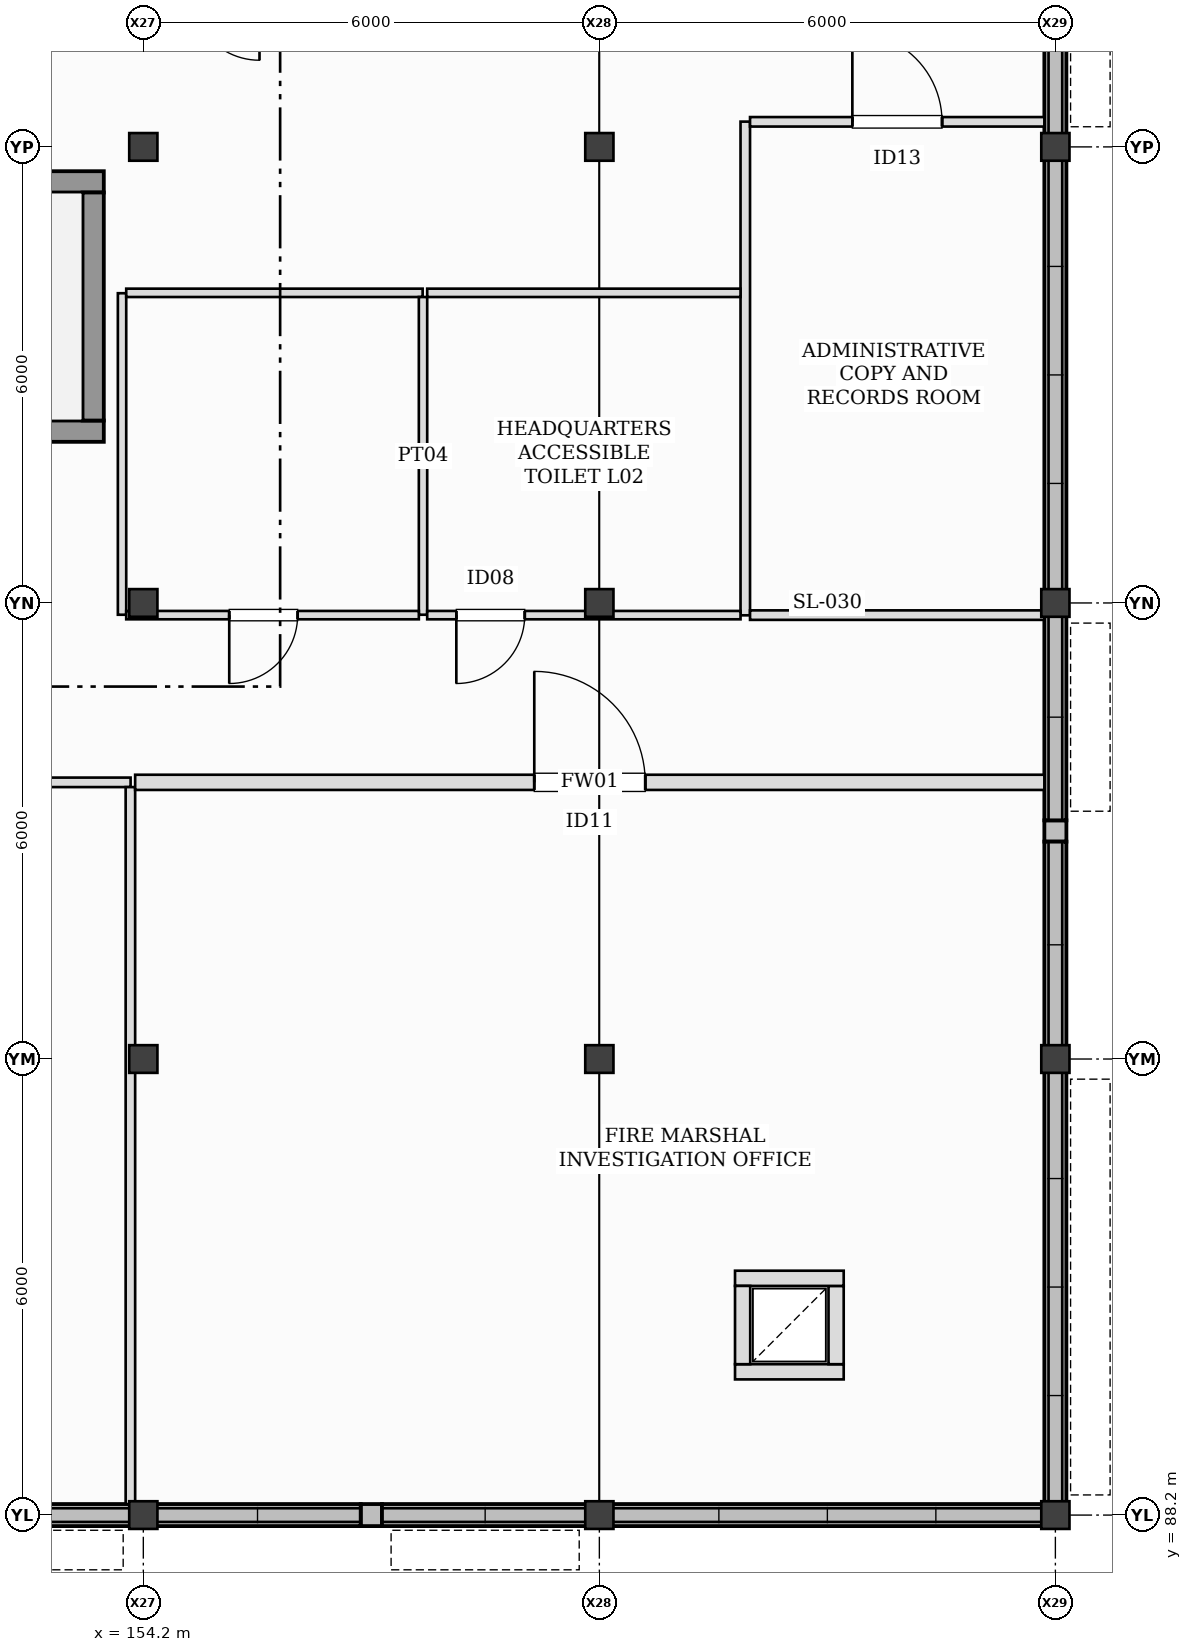
"""IFC4 building model, lengths in metres.
Left out: names, types, materials, properties, quantities, classifications, styles, units other than length and angle.
Written with IfcOpenShell. Run it as: python <this file> out.ifc"""

import sys

from ifc_helpers import new_model, si_unit, direction, frame, frame_2d, origin, origin_2d, place, context, subcontext, project, spatial, rectangle, i_section, extrude, element, fill, save


model = new_model("IFC4")
c1 = context("Model", 3, precision=1e-05, world=origin(), true_north=direction((0.0, 1.0)))
c2 = subcontext(c1, "Body", "Model", "MODEL_VIEW")
j1 = project(units=[si_unit("LENGTHUNIT", "METRE"), si_unit("PLANEANGLEUNIT", "RADIAN")], contexts=[c1])
p1 = place(None, origin())
s1 = spatial("IfcSite", under=j1, at=p1, CompositionType="ELEMENT")
p2 = place(p1, origin())
s2 = spatial("IfcBuilding", under=s1, at=p2, CompositionType="ELEMENT")
p3 = place(p2, frame((0.0, 0.0, 6.0)))
s3 = spatial("IfcBuildingStorey", under=s2, at=p3, CompositionType="ELEMENT", Elevation=6.0)
for number, where, z_axis, x_axis in (
    (1, (154.2, 88.2, 0.0), (0.0, 0.0, 1.0), (1.0, 0.0, 0.0)),
    (2, (154.2, 94.2, 0.0), (0.0, 0.0, 1.0), (1.0, 0.0, 0.0)),
    (3, (154.2, 100.2, 0.0), (0.0, 0.0, 1.0), (1.0, 0.0, 0.0)),
    (4, (154.2, 106.2, 0.0), (0.0, 0.0, 1.0), (1.0, 0.0, 0.0)),
    (5, (160.2, 88.2, 0.0), (0.0, 0.0, 1.0), (1.0, 0.0, 0.0)),
    (6, (160.2, 94.2, 0.0), (0.0, 0.0, 1.0), (1.0, 0.0, 0.0)),
    (7, (160.2, 100.2, 0.0), (0.0, 0.0, 1.0), (1.0, 0.0, 0.0)),
    (8, (160.2, 106.2, 0.0), (0.0, 0.0, 1.0), (1.0, 0.0, 0.0)),
    (9, (166.2, 88.2, 0.0), (0.0, 0.0, 1.0), (1.0, 0.0, 0.0)),
    (10, (166.2, 94.2, 0.0), (0.0, 0.0, 1.0), (1.0, 0.0, 0.0)),
    (11, (166.2, 100.2, 0.0), (0.0, 0.0, 1.0), (1.0, 0.0, 0.0)),
    (12, (166.2, 106.2, 0.0), (0.0, 0.0, 1.0), (1.0, 0.0, 0.0)),
):
    element("IfcColumn", number, at=place(p3, frame(where, z_axis=z_axis, x_axis=x_axis)), inside=s3, PredefinedType="COLUMN", context=c2, shape_type="SweptSolid", body=[
        extrude(i_section(OverallWidth=0.371, OverallDepth=0.364, WebThickness=0.013, FlangeThickness=0.022, at=origin_2d()), origin(), (0.0, 0.0, 1.0), 4.0),
    ])
p4 = place(p3, frame((148.345, 88.2, 0.0), z_axis=(0.0, 0.0, 1.0), x_axis=(1.0, 0.0, 0.0)))
e13 = element("IfcWall", 13, at=p4, inside=s3, PredefinedType="STANDARD", context=c2, shape_type="SweptSolid", body=[
    extrude(rectangle(XDim=5.71, YDim=0.29, at=frame_2d((2.855, 0.0))), origin(), (0.0, 0.0, 1.0), 0.56),
])
p5 = place(p3, frame((157.06, 88.2, 0.0), z_axis=(0.0, 0.0, 1.0), x_axis=(1.0, 0.0, 0.0)))
e14 = element("IfcWall", 14, at=p5, inside=s3, PredefinedType="STANDARD", context=c2, shape_type="SweptSolid", body=[
    extrude(rectangle(XDim=0.28, YDim=0.29, at=frame_2d((0.14, 0.0))), origin(), (0.0, 0.0, 1.0), 3.153),
])
p6 = place(p3, frame((154.345, 88.2, 0.0), z_axis=(0.0, 0.0, 1.0), x_axis=(1.0, 0.0, 0.0)))
e15 = element("IfcWall", 15, at=p6, inside=s3, PredefinedType="STANDARD", context=c2, shape_type="SweptSolid", body=[
    extrude(rectangle(XDim=2.715, YDim=0.29, at=frame_2d((1.357, 0.0))), origin(), (0.0, 0.0, 1.0), 0.68),
])
p7 = place(p3, frame((157.34, 88.2, 0.0), z_axis=(0.0, 0.0, 1.0), x_axis=(1.0, 0.0, 0.0)))
e16 = element("IfcWall", 16, at=p7, inside=s3, PredefinedType="STANDARD", context=c2, shape_type="SweptSolid", body=[
    extrude(rectangle(XDim=2.715, YDim=0.29, at=frame_2d((1.357, 0.0))), origin(), (0.0, 0.0, 1.0), 0.8),
])
p8 = place(p3, frame((160.345, 88.2, 0.0), z_axis=(0.0, 0.0, 1.0), x_axis=(1.0, 0.0, 0.0)))
e17 = element("IfcWall", 17, at=p8, inside=s3, PredefinedType="STANDARD", context=c2, shape_type="SweptSolid", body=[
    extrude(rectangle(XDim=5.71, YDim=0.29, at=frame_2d((2.855, 0.0))), origin(), (0.0, 0.0, 1.0), 0.92),
])
p9 = place(p3, frame((166.2, 88.345, 0.0), z_axis=(0.0, 0.0, 1.0), x_axis=(0.0, 1.0, 0.0)))
e18 = element("IfcWall", 18, at=p9, inside=s3, PredefinedType="STANDARD", context=c2, shape_type="SweptSolid", body=[
    extrude(rectangle(XDim=5.71, YDim=0.29, at=frame_2d((2.855, 0.0))), origin(), (0.0, 0.0, 1.0), 0.32),
])
p10 = place(p3, frame((166.2, 97.06, 0.0), z_axis=(0.0, 0.0, 1.0), x_axis=(0.0, 1.0, 0.0)))
e19 = element("IfcWall", 19, at=p10, inside=s3, PredefinedType="STANDARD", context=c2, shape_type="SweptSolid", body=[
    extrude(rectangle(XDim=0.28, YDim=0.29, at=frame_2d((0.14, 0.0))), origin(), (0.0, 0.0, 1.0), 3.227),
])
p11 = place(p3, frame((166.2, 94.345, 0.0), z_axis=(0.0, 0.0, 1.0), x_axis=(0.0, 1.0, 0.0)))
e20 = element("IfcWall", 20, at=p11, inside=s3, PredefinedType="STANDARD", context=c2, shape_type="SweptSolid", body=[
    extrude(rectangle(XDim=2.715, YDim=0.29, at=frame_2d((1.357, 0.0))), origin(), (0.0, 0.0, 1.0), 0.44),
])
p12 = place(p3, frame((166.2, 97.34, 0.0), z_axis=(0.0, 0.0, 1.0), x_axis=(0.0, 1.0, 0.0)))
e21 = element("IfcWall", 21, at=p12, inside=s3, PredefinedType="STANDARD", context=c2, shape_type="SweptSolid", body=[
    extrude(rectangle(XDim=2.715, YDim=0.29, at=frame_2d((1.357, 0.0))), origin(), (0.0, 0.0, 1.0), 0.56),
])
p13 = place(p3, frame((166.2, 100.345, 0.0), z_axis=(0.0, 0.0, 1.0), x_axis=(0.0, 1.0, 0.0)))
e22 = element("IfcWall", 22, at=p13, inside=s3, PredefinedType="STANDARD", context=c2, shape_type="SweptSolid", body=[
    extrude(rectangle(XDim=5.71, YDim=0.29, at=frame_2d((2.855, 0.0))), origin(), (0.0, 0.0, 1.0), 0.68),
])
p14 = place(p3, frame((166.2, 106.345, 0.0), z_axis=(0.0, 0.0, 1.0), x_axis=(0.0, 1.0, 0.0)))
e23 = element("IfcWall", 23, at=p14, inside=s3, PredefinedType="STANDARD", context=c2, shape_type="SweptSolid", body=[
    extrude(rectangle(XDim=2.715, YDim=0.29, at=frame_2d((1.357, 0.0))), origin(), (0.0, 0.0, 1.0), 0.8),
])
p15 = place(p3, frame((145.52, 102.46, 0.0), z_axis=(0.0, 0.0, 1.0), x_axis=(1.0, 0.0, 0.0)))
e24 = element("IfcWall", 24, at=p15, inside=s3, PredefinedType="SHEAR", context=c2, shape_type="SweptSolid", body=[
    extrude(rectangle(XDim=8.16, YDim=0.28, at=frame_2d((4.08, 0.0))), origin(), (0.0, 0.0, 1.0), 4.0),
])
p16 = place(p15, frame((0.65, 0.0, 0.0)))
e25 = element("IfcOpeningElement", 25, at=p16, cuts=e24, PredefinedType="OPENING", context=c2, shape_type="SweptSolid", body=[
    extrude(rectangle(XDim=0.98, YDim=2.15, at=frame_2d((0.49, 1.075))), frame((0.0, 0.15, 0.0), z_axis=(0.0, -1.0, 0.0), x_axis=(1.0, 0.0, 0.0)), (0.0, 0.0, 1.0), 0.3),
])
p17 = place(p3, frame((153.68, 105.74, 0.0), z_axis=(0.0, 0.0, 1.0), x_axis=(-1.0, 0.0, 0.0)))
e26 = element("IfcWall", 26, at=p17, inside=s3, PredefinedType="SHEAR", context=c2, shape_type="SweptSolid", body=[
    extrude(rectangle(XDim=8.16, YDim=0.28, at=frame_2d((4.08, 0.0))), origin(), (0.0, 0.0, 1.0), 4.0),
])
p18 = place(p3, frame((153.54, 102.6, 0.0), z_axis=(0.0, 0.0, 1.0), x_axis=(0.0, 1.0, 0.0)))
e27 = element("IfcWall", 27, at=p18, inside=s3, PredefinedType="SHEAR", context=c2, shape_type="SweptSolid", body=[
    extrude(rectangle(XDim=3.0, YDim=0.28, at=frame_2d((1.5, 0.0))), origin(), (0.0, 0.0, 1.0), 4.0),
])
p19 = place(p3, frame((161.985, 90.085, 0.0), z_axis=(0.0, 0.0, 1.0), x_axis=(1.0, 0.0, 0.0)))
e28 = element("IfcWall", 28, at=p19, inside=s3, PredefinedType="PARTITIONING", context=c2, shape_type="SweptSolid", body=[
    extrude(rectangle(XDim=1.43, YDim=0.2, at=frame_2d((0.715, 0.0))), origin(), (0.0, 0.0, 1.0), 3.72),
])
p20 = place(p3, frame((163.315, 90.185, 0.0), z_axis=(0.0, 0.0, 1.0), x_axis=(0.0, 1.0, 0.0)))
e29 = element("IfcWall", 29, at=p20, inside=s3, PredefinedType="PARTITIONING", context=c2, shape_type="SweptSolid", body=[
    extrude(rectangle(XDim=1.03, YDim=0.2, at=frame_2d((0.515, 0.0))), origin(), (0.0, 0.0, 1.0), 3.72),
])
p21 = place(p3, frame((163.415, 91.315, 0.0), z_axis=(0.0, 0.0, 1.0), x_axis=(-1.0, 0.0, 0.0)))
e30 = element("IfcWall", 30, at=p21, inside=s3, PredefinedType="PARTITIONING", context=c2, shape_type="SweptSolid", body=[
    extrude(rectangle(XDim=1.43, YDim=0.2, at=frame_2d((0.715, 0.0))), origin(), (0.0, 0.0, 1.0), 3.72),
])
p22 = place(p3, frame((162.085, 91.215, 0.0), z_axis=(0.0, 0.0, 1.0), x_axis=(0.0, -1.0, 0.0)))
e31 = element("IfcWall", 31, at=p22, inside=s3, PredefinedType="PARTITIONING", context=c2, shape_type="SweptSolid", body=[
    extrude(rectangle(XDim=1.03, YDim=0.2, at=frame_2d((0.515, 0.0))), origin(), (0.0, 0.0, 1.0), 3.5),
])
p23 = place(p3, frame((139.942, 97.84, 0.0), z_axis=(0.0, 0.0, 1.0), x_axis=(1.0, 0.0, 0.0)))
e32 = element("IfcWall", 32, at=p23, inside=s3, PredefinedType="PARTITIONING", context=c2, shape_type="SweptSolid", body=[
    extrude(rectangle(XDim=14.09, YDim=0.125, at=frame_2d((7.045, 0.0))), origin(), (0.0, 0.0, 1.0), 3.72),
])
p24 = place(p23, frame((6.565, 0.0, 0.0)))
e33 = element("IfcOpeningElement", 33, at=p24, cuts=e32, PredefinedType="OPENING", context=c2, shape_type="SweptSolid", body=[
    extrude(rectangle(XDim=0.96, YDim=2.15, at=frame_2d((0.48, 1.075))), frame((0.0, 0.073, 0.0), z_axis=(0.0, -1.0, 0.0), x_axis=(1.0, 0.0, 0.0)), (0.0, 0.0, 1.0), 0.145),
])
p25 = place(p3, frame((154.03, 97.778, 0.0), z_axis=(0.0, 0.0, 1.0), x_axis=(0.0, -1.0, 0.0)))
e34 = element("IfcWall", 34, at=p25, inside=s3, PredefinedType="PARTITIONING", context=c2, shape_type="SweptSolid", body=[
    extrude(rectangle(XDim=9.433, YDim=0.125, at=frame_2d((4.716, 0.0))), origin(), (0.0, 0.0, 1.0), 3.157),
])
p26 = place(p3, frame((154.093, 97.84, 0.0), z_axis=(0.0, 0.0, 1.0), x_axis=(1.0, 0.0, 0.0)))
e35 = element("IfcWall", 35, at=p26, inside=s3, PredefinedType="PARTITIONING", context=c2, shape_type="SweptSolid", body=[
    extrude(rectangle(XDim=11.962, YDim=0.2, at=frame_2d((5.981, 0.0))), origin(), (0.0, 0.0, 1.0), 3.72),
])
p27 = place(p26, frame((5.251, 0.0, 0.0)))
e36 = element("IfcOpeningElement", 36, at=p27, cuts=e35, PredefinedType="OPENING", context=c2, shape_type="SweptSolid", body=[
    extrude(rectangle(XDim=1.46, YDim=2.3, at=frame_2d((0.73, 1.15))), frame((0.0, 0.11, 0.0), z_axis=(0.0, -1.0, 0.0), x_axis=(1.0, 0.0, 0.0)), (0.0, 0.0, 1.0), 0.22),
])
p28 = place(p3, frame((153.92, 100.045, 0.0), z_axis=(0.0, 0.0, 1.0), x_axis=(0.0, 1.0, 0.0)))
e37 = element("IfcWall", 37, at=p28, inside=s3, PredefinedType="PARTITIONING", context=c2, shape_type="SweptSolid", body=[
    extrude(rectangle(XDim=4.23, YDim=0.11, at=frame_2d((2.115, 0.0))), origin(), (0.0, 0.0, 1.0), 3.157),
])
p29 = place(p3, frame((153.975, 104.28, 0.0), z_axis=(0.0, 0.0, 1.0), x_axis=(1.0, 0.0, 0.0)))
e38 = element("IfcWall", 38, at=p29, inside=s3, PredefinedType="PARTITIONING", context=c2, shape_type="SweptSolid", body=[
    extrude(rectangle(XDim=3.9, YDim=0.11, at=frame_2d((1.95, 0.0))), origin(), (0.0, 0.0, 1.0), 3.72),
])
p30 = place(p3, frame((157.88, 104.225, 0.0), z_axis=(0.0, 0.0, 1.0), x_axis=(0.0, -1.0, 0.0)))
e39 = element("IfcWall", 39, at=p30, inside=s3, PredefinedType="PARTITIONING", context=c2, shape_type="SweptSolid", body=[
    extrude(rectangle(XDim=4.18, YDim=0.11, at=frame_2d((2.09, 0.0))), origin(), (0.0, 0.0, 1.0), 3.334),
])
p31 = place(p3, frame((157.825, 100.04, 0.0), z_axis=(0.0, 0.0, 1.0), x_axis=(-1.0, 0.0, 0.0)))
e40 = element("IfcWall", 40, at=p31, inside=s3, PredefinedType="PARTITIONING", context=c2, shape_type="SweptSolid", body=[
    extrude(rectangle(XDim=3.85, YDim=0.11, at=frame_2d((1.925, 0.0))), origin(), (0.0, 0.0, 1.0), 3.153),
])
p32 = place(p31, frame((1.594, 0.0, 0.0)))
e41 = element("IfcOpeningElement", 41, at=p32, cuts=e40, PredefinedType="OPENING", context=c2, shape_type="SweptSolid", body=[
    extrude(rectangle(XDim=0.9, YDim=2.1, at=frame_2d((0.45, 1.05))), frame((0.0, 0.065, 0.0), z_axis=(0.0, -1.0, 0.0), x_axis=(1.0, 0.0, 0.0)), (0.0, 0.0, 1.0), 0.13),
])
p33 = place(p3, frame((162.12, 100.038, 0.0), z_axis=(0.0, 0.0, 1.0), x_axis=(0.0, 1.0, 0.0)))
e42 = element("IfcWall", 42, at=p33, inside=s3, PredefinedType="PARTITIONING", context=c2, shape_type="SweptSolid", body=[
    extrude(rectangle(XDim=6.495, YDim=0.125, at=frame_2d((3.248, 0.0))), origin(), (0.0, 0.0, 1.0), 3.449),
])
p34 = place(p3, frame((162.183, 106.53, 0.0), z_axis=(0.0, 0.0, 1.0), x_axis=(1.0, 0.0, 0.0)))
e43 = element("IfcWall", 43, at=p34, inside=s3, PredefinedType="PARTITIONING", context=c2, shape_type="SweptSolid", body=[
    extrude(rectangle(XDim=3.872, YDim=0.125, at=frame_2d((1.936, 0.0))), origin(), (0.0, 0.0, 1.0), 3.223),
])
p35 = place(p34, frame((1.346, 0.0, 0.0)))
e44 = element("IfcOpeningElement", 44, at=p35, cuts=e43, PredefinedType="OPENING", context=c2, shape_type="SweptSolid", body=[
    extrude(rectangle(XDim=1.18, YDim=2.16, at=frame_2d((0.59, 1.08))), frame((0.0, 0.073, 0.0), z_axis=(0.0, -1.0, 0.0), x_axis=(1.0, 0.0, 0.0)), (0.0, 0.0, 1.0), 0.145),
])
p36 = place(p3, frame((166.055, 100.04, 0.0), z_axis=(0.0, 0.0, 1.0), x_axis=(-1.0, 0.0, 0.0)))
e45 = element("IfcWall", 45, at=p36, inside=s3, PredefinedType="PARTITIONING", context=c2, shape_type="SweptSolid", body=[
    extrude(rectangle(XDim=3.872, YDim=0.125, at=frame_2d((1.936, 0.0))), origin(), (0.0, 0.0, 1.0), 3.223),
])
p37 = place(p3, frame((157.935, 104.28, 0.0), z_axis=(0.0, 0.0, 1.0), x_axis=(1.0, 0.0, 0.0)))
e46 = element("IfcWall", 46, at=p37, inside=s3, PredefinedType="PARTITIONING", context=c2, shape_type="SweptSolid", body=[
    extrude(rectangle(XDim=4.123, YDim=0.11, at=frame_2d((2.061, 0.0))), origin(), (0.0, 0.0, 1.0), 3.72),
])
p38 = place(p3, frame((162.058, 100.04, 0.0), z_axis=(0.0, 0.0, 1.0), x_axis=(-1.0, 0.0, 0.0)))
e47 = element("IfcWall", 47, at=p38, inside=s3, PredefinedType="PARTITIONING", context=c2, shape_type="SweptSolid", body=[
    extrude(rectangle(XDim=4.123, YDim=0.11, at=frame_2d((2.061, 0.0))), origin(), (0.0, 0.0, 1.0), 3.153),
])
p39 = place(p38, frame((2.839, 0.0, 0.0)))
e48 = element("IfcOpeningElement", 48, at=p39, cuts=e47, PredefinedType="OPENING", context=c2, shape_type="SweptSolid", body=[
    extrude(rectangle(XDim=0.9, YDim=2.1, at=frame_2d((0.45, 1.05))), frame((0.0, 0.065, 0.0), z_axis=(0.0, -1.0, 0.0), x_axis=(1.0, 0.0, 0.0)), (0.0, 0.0, 1.0), 0.13),
])
p40 = place(p27, frame((1.46, 0.0, 0.0), z_axis=(0.0, 0.0, 1.0), x_axis=(-1.0, 0.0, 0.0)))
e49 = element("IfcDoor", 49, at=p40, inside=s3, OperationType="SINGLE_SWING_LEFT", PredefinedType="DOOR", context=c2, shape_type="SweptSolid", body=[
    extrude(rectangle(XDim=1.46, YDim=2.3, at=frame_2d((0.73, 1.15))), frame((0.0, 0.025, 0.0), z_axis=(0.0, -1.0, 0.0), x_axis=(1.0, 0.0, 0.0)), (0.0, 0.0, 1.0), 0.05),
])
fill(e36, e49)
p41 = place(p32, frame((0.9, 0.0, 0.0), z_axis=(0.0, 0.0, 1.0), x_axis=(-1.0, 0.0, 0.0)))
e50 = element("IfcDoor", 50, at=p41, inside=s3, OperationType="SINGLE_SWING_RIGHT", PredefinedType="DOOR", context=c2, shape_type="SweptSolid", body=[
    extrude(rectangle(XDim=0.9, YDim=2.1, at=frame_2d((0.45, 1.05))), frame((0.0, 0.025, 0.0), z_axis=(0.0, -1.0, 0.0), x_axis=(1.0, 0.0, 0.0)), (0.0, 0.0, 1.0), 0.05),
])
fill(e41, e50)
p42 = place(p35, frame((1.18, 0.0, 0.0), z_axis=(0.0, 0.0, 1.0), x_axis=(-1.0, 0.0, 0.0)))
e51 = element("IfcDoor", 51, at=p42, inside=s3, OperationType="SINGLE_SWING_LEFT", PredefinedType="DOOR", context=c2, shape_type="SweptSolid", body=[
    extrude(rectangle(XDim=1.18, YDim=2.16, at=frame_2d((0.59, 1.08))), frame((0.0, 0.025, 0.0), z_axis=(0.0, -1.0, 0.0), x_axis=(1.0, 0.0, 0.0)), (0.0, 0.0, 1.0), 0.05),
])
fill(e44, e51)
p43 = place(p39, frame((0.9, 0.0, 0.0), z_axis=(0.0, 0.0, 1.0), x_axis=(-1.0, 0.0, 0.0)))
e52 = element("IfcDoor", 52, at=p43, inside=s3, OperationType="SINGLE_SWING_RIGHT", PredefinedType="DOOR", context=c2, shape_type="SweptSolid", body=[
    extrude(rectangle(XDim=0.9, YDim=2.1, at=frame_2d((0.45, 1.05))), frame((0.0, 0.025, 0.0), z_axis=(0.0, -1.0, 0.0), x_axis=(1.0, 0.0, 0.0)), (0.0, 0.0, 1.0), 0.05),
])
fill(e48, e52)
save(model, sys.argv[1])
